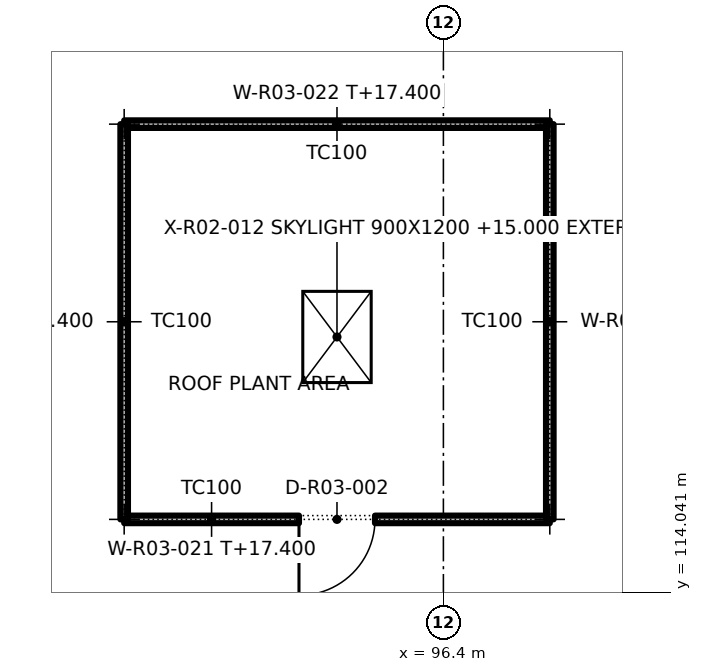
"""IFC4 building model, lengths in metres.
Left out: names, types, materials, properties, quantities, classifications, styles, units other than length and angle.
Written with IfcOpenShell. Run it as: python <this file> out.ifc"""

import sys

from ifc_helpers import new_model, si_unit, direction, frame, frame_2d, origin, origin_2d, place, context, subcontext, project, spatial, rectangle, extrude, element, fill, save


model = new_model("IFC4")
c1 = context("Model", 3, precision=1e-05, world=origin(), true_north=direction((0.0, 1.0)))
c2 = subcontext(c1, "Body", "Model", "MODEL_VIEW")
j1 = project(units=[si_unit("LENGTHUNIT", "METRE"), si_unit("PLANEANGLEUNIT", "RADIAN")], contexts=[c1])
p1 = place(None, origin())
s1 = spatial("IfcSite", under=j1, at=p1, CompositionType="ELEMENT")
p2 = place(p1, origin())
s2 = spatial("IfcBuilding", under=s1, at=p2, CompositionType="ELEMENT")
p3 = place(p2, frame((0.0, 0.0, 15.0)))
s3 = spatial("IfcBuildingStorey", under=s2, at=p3, CompositionType="ELEMENT", Elevation=15.0)
p4 = place(p3, frame((92.2, 115.0, 0.0), z_axis=(0.0, 0.0, 1.0), x_axis=(1.0, 0.0, 0.0)))
e1 = element("IfcWall", 1, at=p4, inside=s3, PredefinedType="SOLIDWALL", context=c2, shape_type="SweptSolid", body=[
    extrude(rectangle(XDim=5.6, YDim=0.1, at=frame_2d((2.8, 0.0))), origin(), (0.0, 0.0, 1.0), 2.4),
])
p5 = place(p4, frame((2.3, 0.0, 0.0)))
e2 = element("IfcOpeningElement", 2, at=p5, cuts=e1, PredefinedType="OPENING", context=c2, shape_type="SweptSolid", body=[
    extrude(rectangle(XDim=1.0, YDim=2.1, at=frame_2d((0.5, 1.05))), frame((0.0, 0.06, 0.0), z_axis=(0.0, -1.0, 0.0), x_axis=(1.0, 0.0, 0.0)), (0.0, 0.0, 1.0), 0.12),
])
p6 = place(p3, frame((92.2, 120.2, 0.0), z_axis=(0.0, 0.0, 1.0), x_axis=(1.0, 0.0, 0.0)))
e3 = element("IfcWall", 3, at=p6, inside=s3, PredefinedType="SOLIDWALL", context=c2, shape_type="SweptSolid", body=[
    extrude(rectangle(XDim=5.6, YDim=0.1, at=frame_2d((2.8, 0.0))), origin(), (0.0, 0.0, 1.0), 2.4),
])
for number, where, z_axis, x_axis in (
    (4, (92.2, 115.0, 0.0), (0.0, 0.0, 1.0), (0.0, 1.0, 0.0)),
    (5, (97.8, 115.0, 0.0), (0.0, 0.0, 1.0), (0.0, 1.0, 0.0)),
):
    element("IfcWall", number, at=place(p3, frame(where, z_axis=z_axis, x_axis=x_axis)), inside=s3, PredefinedType="SOLIDWALL", context=c2, shape_type="SweptSolid", body=[
        extrude(rectangle(XDim=5.2, YDim=0.1, at=frame_2d((2.6, 0.0))), origin(), (0.0, 0.0, 1.0), 2.4),
    ])
p7 = place(p3, frame((0.0, 0.0, -0.18)))
p8 = place(p7, frame((95.0, 117.4, 0.0)))
p9 = place(p8, frame((0.0, 0.0, 0.13)))
e6 = element("IfcWindow", 6, at=p9, inside=s3, PartitioningType="SINGLE_PANEL", PredefinedType="SKYLIGHT", context=c2, shape_type="SweptSolid", body=[
    extrude(rectangle(XDim=0.9, YDim=1.2, at=origin_2d()), origin(), (0.0, 0.0, 1.0), 0.05),
])
p10 = place(p5, frame((1.0, 0.0, 0.0), z_axis=(0.0, 0.0, 1.0), x_axis=(-1.0, 0.0, 0.0)))
e7 = element("IfcDoor", 7, at=p10, inside=s3, OperationType="SINGLE_SWING_RIGHT", PredefinedType="DOOR", context=c2, shape_type="SweptSolid", body=[
    extrude(rectangle(XDim=1.0, YDim=2.1, at=frame_2d((0.5, 1.05))), frame((0.0, 0.025, 0.0), z_axis=(0.0, -1.0, 0.0), x_axis=(1.0, 0.0, 0.0)), (0.0, 0.0, 1.0), 0.05),
])
fill(e2, e7)
save(model, sys.argv[1])
